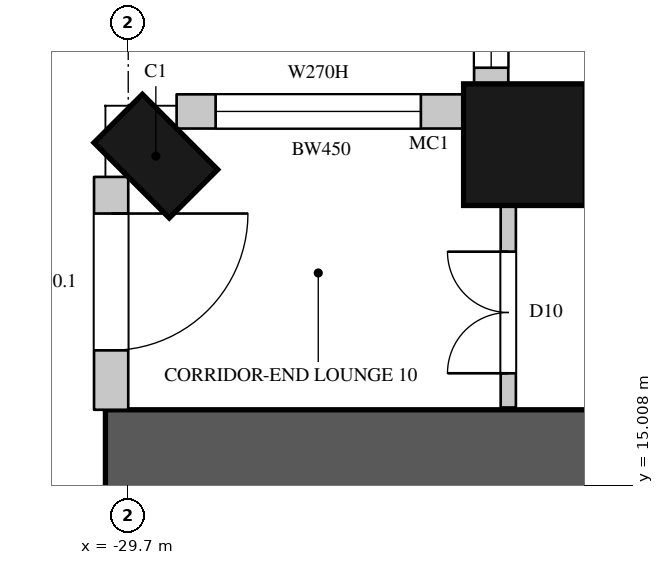
"""IFC4 building model, lengths in metres.
Left out: names, types, materials, properties, quantities, classifications, styles, units other than length and angle.
Written with IfcOpenShell. Run it as: python <this file> out.ifc"""

import sys

from ifc_helpers import new_model, si_unit, direction, frame, frame_2d, origin, origin_2d, place, context, subcontext, project, spatial, rectangle, circle, extrude, element, fill, save


model = new_model("IFC4")
c1 = context("Model", 3, precision=1e-05, world=origin(), true_north=direction((0.0, 1.0)))
c2 = subcontext(c1, "Body", "Model", "MODEL_VIEW")
j1 = project(units=[si_unit("LENGTHUNIT", "METRE"), si_unit("PLANEANGLEUNIT", "RADIAN")], contexts=[c1])
p1 = place(None, origin())
s1 = spatial("IfcSite", under=j1, at=p1, CompositionType="ELEMENT")
p2 = place(p1, origin())
s2 = spatial("IfcBuilding", under=s1, at=p2, CompositionType="ELEMENT")
p3 = place(p2, frame((0.0, 0.0, 66.3)))
s3 = spatial("IfcBuildingStorey", under=s2, at=p3, CompositionType="ELEMENT", Elevation=66.3)
p4 = place(p3, frame((-29.337, 19.337, 0.0), z_axis=(0.0, 0.0, 1.0), x_axis=(-0.707106781187, -0.707106781187, 0.0)))
e1 = element("IfcColumn", 1, at=p4, inside=s3, PredefinedType="COLUMN", context=c2, shape_type="SweptSolid", body=[
    extrude(rectangle(XDim=0.9, YDim=1.4, at=origin_2d()), origin(), (0.0, 0.0, 1.0), 3.6),
])
p5 = place(p3, frame((-24.488, 19.488, 0.0), z_axis=(0.0, 0.0, 1.0), x_axis=(1.0, 0.0, 0.0)))
e2 = element("IfcColumn", 2, at=p5, inside=s3, PredefinedType="COLUMN", context=c2, shape_type="SweptSolid", body=[
    extrude(circle(Radius=0.8, at=origin_2d()), origin(), (0.0, 0.0, 1.0), 3.6),
])
p6 = place(p3, frame((-29.925, 19.064, 0.0), z_axis=(0.0, 0.0, 1.0), x_axis=(0.0, -1.0, 0.0)))
e3 = element("IfcWall", 3, at=p6, inside=s3, PredefinedType="SOLIDWALL", context=c2, shape_type="SweptSolid", body=[
    extrude(rectangle(XDim=3.064, YDim=0.45, at=frame_2d((1.532, 0.0))), origin(), (0.0, 0.0, 1.0), 3.3),
])
p7 = place(p6, frame((0.482, 0.0, 0.0)))
e4 = element("IfcOpeningElement", 4, at=p7, cuts=e3, PredefinedType="OPENING", context=c2, shape_type="SweptSolid", body=[
    extrude(rectangle(XDim=1.8, YDim=2.4, at=frame_2d((0.9, 1.2))), frame((0.0, 0.235, 0.0), z_axis=(0.0, -1.0, 0.0), x_axis=(1.0, 0.0, 0.0)), (0.0, 0.0, 1.0), 0.47),
])
p8 = place(p3, frame((-24.925, 22.05, 0.0), z_axis=(0.0, 0.0, 1.0), x_axis=(0.0, -1.0, 0.0)))
e5 = element("IfcWall", 5, at=p8, inside=s3, PredefinedType="SOLIDWALL", context=c2, shape_type="SweptSolid", body=[
    extrude(rectangle(XDim=1.792, YDim=0.45, at=frame_2d((0.896, 0.0))), origin(), (0.0, 0.0, 1.0), 3.3),
])
p9 = place(p8, frame((0.35, 0.0, 1.05)))
e6 = element("IfcOpeningElement", 6, at=p9, cuts=e5, PredefinedType="OPENING", context=c2, shape_type="SweptSolid", body=[
    extrude(rectangle(XDim=1.2, YDim=2.0, at=frame_2d((0.6, 1.0))), frame((0.0, 0.235, 0.0), z_axis=(0.0, -1.0, 0.0), x_axis=(1.0, 0.0, 0.0)), (0.0, 0.0, 1.0), 0.47),
])
p10 = place(p3, frame((-25.259, 19.925, 0.0), z_axis=(0.0, 0.0, 1.0), x_axis=(-1.0, 0.0, 0.0)))
e7 = element("IfcWall", 7, at=p10, inside=s3, PredefinedType="SOLIDWALL", context=c2, shape_type="SweptSolid", body=[
    extrude(rectangle(XDim=3.805, YDim=0.45, at=frame_2d((1.903, 0.0))), origin(), (0.0, 0.0, 1.0), 3.3),
])
p11 = place(p10, frame((0.592, 0.0, 1.05)))
e8 = element("IfcOpeningElement", 8, at=p11, cuts=e7, PredefinedType="OPENING", context=c2, shape_type="SweptSolid", body=[
    extrude(rectangle(XDim=2.7, YDim=2.0, at=frame_2d((1.35, 1.0))), frame((0.0, 0.235, 0.0), z_axis=(0.0, -1.0, 0.0), x_axis=(1.0, 0.0, 0.0)), (0.0, 0.0, 1.0), 0.47),
])
p12 = place(p3, frame((-30.0, 15.4, 0.0), z_axis=(0.0, 0.0, 1.0), x_axis=(1.0, 0.0, 0.0)))
e9 = element("IfcWall", 9, at=p12, inside=s3, PredefinedType="SHEAR", context=c2, shape_type="SweptSolid", body=[
    extrude(rectangle(XDim=16.0, YDim=1.2, at=frame_2d((8.0, 0.0))), origin(), (0.0, 0.0, 1.0), 3.6),
])
p13 = place(p12, frame((13.4, 0.0, 0.0)))
e10 = element("IfcOpeningElement", 10, at=p13, cuts=e9, PredefinedType="OPENING", context=c2, shape_type="SweptSolid", body=[
    extrude(rectangle(XDim=1.5, YDim=2.4, at=frame_2d((0.75, 1.2))), frame((0.0, 0.61, 0.0), z_axis=(0.0, -1.0, 0.0), x_axis=(1.0, 0.0, 0.0)), (0.0, 0.0, 1.0), 1.22),
])
p14 = place(p3, frame((-24.7, 16.03, 0.0), z_axis=(0.0, 0.0, 1.0), x_axis=(0.0, 1.0, 0.0)))
e11 = element("IfcWall", 11, at=p14, inside=s3, PredefinedType="PARTITIONING", context=c2, shape_type="SweptSolid", body=[
    extrude(rectangle(XDim=2.67, YDim=0.2, at=frame_2d((1.335, 0.0))), origin(), (0.0, 0.0, 1.0), 3.3),
])
p15 = place(p14, frame((0.45, 0.0, 0.0)))
e12 = element("IfcOpeningElement", 12, at=p15, cuts=e11, PredefinedType="OPENING", context=c2, shape_type="SweptSolid", body=[
    extrude(rectangle(XDim=1.6, YDim=2.4, at=frame_2d((0.8, 1.2))), frame((0.0, 0.11, 0.0), z_axis=(0.0, -1.0, 0.0), x_axis=(1.0, 0.0, 0.0)), (0.0, 0.0, 1.0), 0.22),
])
p16 = place(p3, frame((-23.7, 19.7, 0.0), z_axis=(0.0, 0.0, 1.0), x_axis=(1.0, 0.0, 0.0)))
e13 = element("IfcWall", 13, at=p16, inside=s3, PredefinedType="PARTITIONING", context=c2, shape_type="SweptSolid", body=[
    extrude(rectangle(XDim=3.0, YDim=0.2, at=frame_2d((1.5, 0.0))), origin(), (0.0, 0.0, 1.0), 3.3),
])
p17 = place(p16, frame((0.8, 0.0, 0.0)))
e14 = element("IfcOpeningElement", 14, at=p17, cuts=e13, PredefinedType="OPENING", context=c2, shape_type="SweptSolid", body=[
    extrude(rectangle(XDim=0.9, YDim=2.2, at=frame_2d((0.45, 1.1))), frame((0.0, 0.11, 0.0), z_axis=(0.0, -1.0, 0.0), x_axis=(1.0, 0.0, 0.0)), (0.0, 0.0, 1.0), 0.22),
])
p18 = place(p7, origin())
e15 = element("IfcDoor", 15, at=p18, inside=s3, OperationType="SLIDING_TO_LEFT", PredefinedType="DOOR", context=c2, shape_type="SweptSolid", body=[
    extrude(rectangle(XDim=1.8, YDim=2.4, at=frame_2d((0.9, 1.2))), frame((0.0, 0.13, 0.0), z_axis=(0.0, -1.0, 0.0), x_axis=(1.0, 0.0, 0.0)), (0.0, 0.0, 1.0), 0.05),
])
fill(e4, e15)
p19 = place(p9, origin())
e16 = element("IfcWindow", 16, at=p19, inside=s3, PartitioningType="SINGLE_PANEL", PredefinedType="WINDOW", context=c2, shape_type="SweptSolid", body=[
    extrude(rectangle(XDim=1.2, YDim=2.0, at=frame_2d((0.6, 1.0))), frame((0.0, 0.135, 0.0), z_axis=(0.0, -1.0, 0.0), x_axis=(1.0, 0.0, 0.0)), (0.0, 0.0, 1.0), 0.06),
])
fill(e6, e16)
p20 = place(p11, origin())
e17 = element("IfcWindow", 17, at=p20, inside=s3, PartitioningType="SINGLE_PANEL", PredefinedType="WINDOW", context=c2, shape_type="SweptSolid", body=[
    extrude(rectangle(XDim=2.7, YDim=2.0, at=frame_2d((1.35, 1.0))), frame((0.0, 0.135, 0.0), z_axis=(0.0, -1.0, 0.0), x_axis=(1.0, 0.0, 0.0)), (0.0, 0.0, 1.0), 0.06),
])
fill(e8, e17)
p21 = place(p15, origin())
e18 = element("IfcDoor", 18, at=p21, inside=s3, OperationType="DOUBLE_DOOR_SINGLE_SWING", PredefinedType="DOOR", context=c2, shape_type="SweptSolid", body=[
    extrude(rectangle(XDim=1.6, YDim=2.4, at=frame_2d((0.8, 1.2))), frame((0.0, 0.025, 0.0), z_axis=(0.0, -1.0, 0.0), x_axis=(1.0, 0.0, 0.0)), (0.0, 0.0, 1.0), 0.05),
])
fill(e12, e18)
save(model, sys.argv[1])
